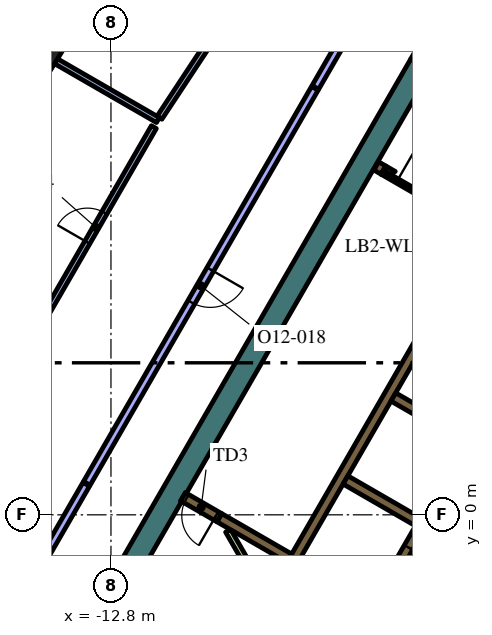
"""IFC4 building model, lengths in metres.
Left out: names, types, materials, properties, quantities, classifications, styles, units other than length and angle.
Written with IfcOpenShell. Run it as: python <this file> out.ifc"""

import sys

from ifc_helpers import new_model, si_unit, direction, frame, frame_2d, origin, origin_2d, place, context, subcontext, project, spatial, polyline, rectangle, outline, extrude, element, fill, save


model = new_model("IFC4")
c1 = context("Model", 3, precision=1e-05, world=origin(), true_north=direction((0.0, 1.0)))
c2 = subcontext(c1, "Body", "Model", "MODEL_VIEW")
j1 = project(units=[si_unit("LENGTHUNIT", "METRE"), si_unit("PLANEANGLEUNIT", "RADIAN")], contexts=[c1])
p1 = place(None, origin())
s1 = spatial("IfcSite", under=j1, at=p1, CompositionType="ELEMENT")
p2 = place(p1, origin())
s2 = spatial("IfcBuilding", under=s1, at=p2, CompositionType="ELEMENT")
p3 = place(p2, frame((0.0, 0.0, 283.8)))
s3 = spatial("IfcBuildingStorey", under=s2, at=p3, CompositionType="ELEMENT", Elevation=283.8)
p4 = place(p3, frame((-14.556, 12.098, 0.0), z_axis=(0.0, 0.0, 1.0), x_axis=(-0.525609744083, -0.850725805959, 0.0)))
e1 = element("IfcColumn", 1, at=p4, inside=s3, PredefinedType="COLUMN", context=c2, shape_type="SweptSolid", body=[
    extrude(rectangle(XDim=1.0, YDim=0.7, at=origin_2d()), origin(), (0.0, 0.0, 1.0), 4.2),
])
p5 = place(p3, origin())
e2 = element("IfcWall", 2, at=p5, inside=s3, PredefinedType="SOLIDWALL", context=c2, shape_type="SweptSolid", body=[
    extrude(outline(polyline([(-15.502, -6.35), (-4.912, 11.992), (-4.393, 11.692), (-10.815, 0.569), (-10.84, 0.583), (-10.84, 0.583), (-10.84, 0.583), (-10.965, 0.367), (-10.965, 0.367), (-10.965, 0.367), (-10.94, 0.352), (-11.033, 0.191), (-14.809, -6.35), (-15.156, -6.95), (-15.502, -6.35)])), origin(), (0.0, 0.0, 1.0), 4.2),
])
p6 = place(p3, frame((-8.06, -1.311, 0.0), z_axis=(0.0, 0.0, 1.0), x_axis=(0.50000273126, 0.866023826885, 0.0)))
e3 = element("IfcWall", 3, at=p6, inside=s3, PredefinedType="SOLIDWALL", context=c2, shape_type="SweptSolid", body=[
    extrude(rectangle(XDim=10.33, YDim=0.25, at=frame_2d((5.165, 0.0))), origin(), (0.0, 0.0, 1.0), 4.2),
])
for number, where, z_axis, x_axis in (
    (4, (-5.369, 3.1, 0.0), (0.0, 0.0, 1.0), (0.866, -0.5, 0.0)),
    (5, (-4.724, -0.182, 0.0), (0.0, 0.0, 1.0), (-0.866, 0.5, 0.0)),
):
    element("IfcWall", number, at=place(p3, frame(where, z_axis=z_axis, x_axis=x_axis)), inside=s3, PredefinedType="SOLIDWALL", context=c2, shape_type="SweptSolid", body=[
        extrude(rectangle(XDim=2.2, YDim=0.25, at=frame_2d((1.1, 0.0))), origin(), (0.0, 0.0, 1.0), 4.2),
    ])
p7 = place(p3, frame((-9.95, -0.075, 0.0), z_axis=(0.0, 0.0, 1.0), x_axis=(0.865962177421, -0.500109495288, 0.0)))
e6 = element("IfcWall", 6, at=p7, inside=s3, PredefinedType="SOLIDWALL", context=c2, shape_type="SweptSolid", body=[
    extrude(rectangle(XDim=2.129, YDim=0.25, at=frame_2d((1.065, 0.0))), origin(), (0.0, 0.0, 1.0), 4.2),
])
p8 = place(p3, frame((-5.629, 9.07, 0.0), z_axis=(0.0, 0.0, 1.0), x_axis=(-0.866185586049, 0.49972245349, 0.0)))
e7 = element("IfcWall", 7, at=p8, inside=s3, PredefinedType="SOLIDWALL", context=c2, shape_type="SweptSolid", body=[
    extrude(rectangle(XDim=0.22, YDim=0.25, at=frame_2d((0.11, 0.0))), origin(), (0.0, 0.0, 1.0), 4.2),
])
e8 = element("IfcWall", 8, at=p5, inside=s3, PredefinedType="SOLIDWALL", context=c2, shape_type="SweptSolid", body=[
    extrude(outline(polyline([(-5.689, 8.96), (-5.69, 8.961), (-5.565, 9.177), (-5.319, 9.035), (-5.335, 9.026), (-5.351, 9.015), (-5.366, 9.002), (-5.379, 8.988), (-5.392, 8.972), (-5.402, 8.956), (-5.412, 8.939), (-5.629, 9.064), (-5.629, 9.064), (-5.689, 8.96)])), origin(), (0.0, 0.0, 1.0), 4.2),
])
p9 = place(p3, frame((-9.718, -0.417, 0.0), z_axis=(0.0, 0.0, 1.0), x_axis=(0.499966538646, -0.866044721844, 0.0)))
e9 = element("IfcWall", 9, at=p9, inside=s3, PredefinedType="PARTITIONING", context=c2, shape_type="SweptSolid", body=[
    extrude(rectangle(XDim=2.511, YDim=0.15, at=frame_2d((1.255, 0.0))), origin(), (0.0, 0.0, 1.0), 3.55),
])
p10 = place(p3, frame((-0.898, 6.194, 0.0), z_axis=(0.0, 0.0, 1.0), x_axis=(-0.499996202215, -0.866027596426, 0.0)))
e10 = element("IfcWall", 10, at=p10, inside=s3, PredefinedType="SOLIDWALL", context=c2, shape_type="SweptSolid", body=[
    extrude(rectangle(XDim=9.83, YDim=0.25, at=frame_2d((4.915, 0.0))), origin(), (0.0, 0.0, 1.0), 4.2),
])
p11 = place(p10, frame((0.585, 0.0, 0.0)))
e11 = element("IfcOpeningElement", 11, at=p11, cuts=e10, PredefinedType="OPENING", context=c2, shape_type="SweptSolid", body=[
    extrude(rectangle(XDim=1.1, YDim=2.1, at=frame_2d((0.55, 1.05))), frame((0.0, 0.135, 0.0), z_axis=(0.0, -1.0, 0.0), x_axis=(1.0, 0.0, 0.0)), (0.0, 0.0, 1.0), 0.27),
])
p12 = place(p10, frame((3.105, 0.0, 0.0)))
e12 = element("IfcOpeningElement", 12, at=p12, cuts=e10, PredefinedType="OPENING", context=c2, shape_type="SweptSolid", body=[
    extrude(rectangle(XDim=1.1, YDim=2.1, at=frame_2d((0.55, 1.05))), frame((0.0, 0.135, 0.0), z_axis=(0.0, -1.0, 0.0), x_axis=(1.0, 0.0, 0.0)), (0.0, 0.0, 1.0), 0.27),
])
p13 = place(p10, frame((5.625, 0.0, 0.0)))
e13 = element("IfcOpeningElement", 13, at=p13, cuts=e10, PredefinedType="OPENING", context=c2, shape_type="SweptSolid", body=[
    extrude(rectangle(XDim=1.1, YDim=2.1, at=frame_2d((0.55, 1.05))), frame((0.0, 0.135, 0.0), z_axis=(0.0, -1.0, 0.0), x_axis=(1.0, 0.0, 0.0)), (0.0, 0.0, 1.0), 0.27),
])
p14 = place(p10, frame((8.145, 0.0, 0.0)))
e14 = element("IfcOpeningElement", 14, at=p14, cuts=e10, PredefinedType="OPENING", context=c2, shape_type="SweptSolid", body=[
    extrude(rectangle(XDim=1.1, YDim=2.1, at=frame_2d((0.55, 1.05))), frame((0.0, 0.135, 0.0), z_axis=(0.0, -1.0, 0.0), x_axis=(1.0, 0.0, 0.0)), (0.0, 0.0, 1.0), 0.27),
])
p15 = place(p3, frame((-5.659, 9.012, 0.0), z_axis=(0.0, 0.0, 1.0), x_axis=(0.866009402589, -0.500027713859, 0.0)))
e15 = element("IfcWall", 15, at=p15, inside=s3, PredefinedType="PARTITIONING", context=c2, shape_type="SweptSolid", body=[
    extrude(rectangle(XDim=2.1, YDim=0.12, at=frame_2d((1.05, 0.0))), origin(), (0.0, 0.0, 1.0), 3.55),
])
p16 = place(p15, frame((0.45, 0.0, 0.0)))
e16 = element("IfcOpeningElement", 16, at=p16, cuts=e15, PredefinedType="OPENING", context=c2, shape_type="SweptSolid", body=[
    extrude(rectangle(XDim=1.2, YDim=2.1, at=frame_2d((0.6, 1.05))), frame((0.0, 0.07, 0.0), z_axis=(0.0, -1.0, 0.0), x_axis=(1.0, 0.0, 0.0)), (0.0, 0.0, 1.0), 0.14),
])
p17 = place(p3, frame((-4.652, 11.842, 0.0), z_axis=(0.0, 0.0, 1.0), x_axis=(0.500062241894, 0.865989465428, 0.0)))
e17 = element("IfcWall", 17, at=p17, inside=s3, PredefinedType="SOLIDWALL", context=c2, shape_type="SweptSolid", body=[
    extrude(rectangle(XDim=1.7, YDim=0.6, at=frame_2d((0.85, 0.0))), origin(), (0.0, 0.0, 1.0), 4.2),
])
p18 = place(p17, frame((0.25, 0.0, 0.0)))
e18 = element("IfcOpeningElement", 18, at=p18, cuts=e17, PredefinedType="OPENING", context=c2, shape_type="SweptSolid", body=[
    extrude(rectangle(XDim=1.2, YDim=2.1, at=frame_2d((0.6, 1.05))), frame((0.0, 0.31, 0.0), z_axis=(0.0, -1.0, 0.0), x_axis=(1.0, 0.0, 0.0)), (0.0, 0.0, 1.0), 0.62),
])
p19 = place(p3, frame((-9.95, -0.075, 0.0), z_axis=(0.0, 0.0, 1.0), x_axis=(-0.865952669392, 0.500125958508, 0.0)))
e19 = element("IfcWall", 19, at=p19, inside=s3, PredefinedType="SOLIDWALL", context=c2, shape_type="SweptSolid", body=[
    extrude(rectangle(XDim=1.1, YDim=0.25, at=frame_2d((0.55, 0.0))), origin(), (0.0, 0.0, 1.0), 4.2),
])
p20 = place(p19, frame((0.1, 0.0, 0.0)))
e20 = element("IfcOpeningElement", 20, at=p20, cuts=e19, PredefinedType="OPENING", context=c2, shape_type="SweptSolid", body=[
    extrude(rectangle(XDim=0.9, YDim=2.1, at=frame_2d((0.45, 1.05))), frame((0.0, 0.135, 0.0), z_axis=(0.0, -1.0, 0.0), x_axis=(1.0, 0.0, 0.0)), (0.0, 0.0, 1.0), 0.27),
])
p21 = place(p3, frame((-11.564, 10.387, 0.0), z_axis=(0.0, 0.0, 1.0), x_axis=(-0.86604641216, 0.499963610661, 0.0)))
e21 = element("IfcWall", 21, at=p21, inside=s3, PredefinedType="PARTITIONING", context=c2, shape_type="SweptSolid", body=[
    extrude(rectangle(XDim=3.096, YDim=0.15, at=frame_2d((1.548, 0.0))), origin(), (0.0, 0.0, 1.0), 3.55),
])
p22 = place(p3, frame((-11.523, 10.449, 0.0), z_axis=(0.0, 0.0, 1.0), x_axis=(0.550751709023, 0.834669129061, 0.0)))
e22 = element("IfcWall", 22, at=p22, inside=s3, PredefinedType="PARTITIONING", context=c2, shape_type="SweptSolid", body=[
    extrude(rectangle(XDim=5.788, YDim=0.15, at=frame_2d((2.894, 0.0))), origin(), (0.0, 0.0, 1.0), 3.55),
])
p23 = place(p22, frame((2.488, 0.0, 0.0)))
e23 = element("IfcOpeningElement", 23, at=p23, cuts=e22, PredefinedType="OPENING", context=c2, shape_type="SweptSolid", body=[
    extrude(rectangle(XDim=0.9, YDim=2.1, at=frame_2d((0.45, 1.05))), frame((0.0, 0.085, 0.0), z_axis=(0.0, -1.0, 0.0), x_axis=(1.0, 0.0, 0.0)), (0.0, 0.0, 1.0), 0.17),
])
p24 = place(p3, frame((-14.74, 4.887, 0.0), z_axis=(0.0, 0.0, 1.0), x_axis=(0.500007141444, 0.86602128063, 0.0)))
e24 = element("IfcWall", 24, at=p24, inside=s3, PredefinedType="PARTITIONING", context=c2, shape_type="SweptSolid", body=[
    extrude(rectangle(XDim=6.137, YDim=0.15, at=frame_2d((3.068, 0.0))), origin(), (0.0, 0.0, 1.0), 3.55),
])
p25 = place(p24, frame((2.637, 0.0, 0.0)))
e25 = element("IfcOpeningElement", 25, at=p25, cuts=e24, PredefinedType="OPENING", context=c2, shape_type="SweptSolid", body=[
    extrude(rectangle(XDim=0.9, YDim=2.1, at=frame_2d((0.45, 1.05))), frame((0.0, 0.085, 0.0), z_axis=(0.0, -1.0, 0.0), x_axis=(1.0, 0.0, 0.0)), (0.0, 0.0, 1.0), 0.17),
])
p26 = place(p3, frame((-7.436, 11.221, 0.0), z_axis=(0.0, 0.0, 1.0), x_axis=(-0.49999894854, -0.866026010844, 0.0)))
e26 = element("IfcWall", 26, at=p26, inside=s3, PredefinedType="PARTITIONING", context=c2, shape_type="SweptSolid", body=[
    extrude(rectangle(XDim=12.0, YDim=0.2, at=frame_2d((6.0, 0.0))), origin(), (0.0, 0.0, 1.0), 3.55),
])
p27 = place(p26, frame((5.5, 0.0, 0.0)))
e27 = element("IfcOpeningElement", 27, at=p27, cuts=e26, PredefinedType="OPENING", context=c2, shape_type="SweptSolid", body=[
    extrude(rectangle(XDim=1.0, YDim=2.1, at=frame_2d((0.5, 1.05))), frame((0.0, 0.11, 0.0), z_axis=(0.0, -1.0, 0.0), x_axis=(1.0, 0.0, 0.0)), (0.0, 0.0, 1.0), 0.22),
])
p28 = place(p3, frame((-13.451, 0.803, 0.0), z_axis=(0.0, 0.0, 1.0), x_axis=(-0.499982585408, -0.86603545787, 0.0)))
e28 = element("IfcWall", 28, at=p28, inside=s3, PredefinedType="PARTITIONING", context=c2, shape_type="SweptSolid", body=[
    extrude(rectangle(XDim=8.26, YDim=0.2, at=frame_2d((4.13, 0.0))), origin(), (0.0, 0.0, 1.0), 3.55),
])
p29 = place(p3, frame((-3.306, 18.374, 0.0), z_axis=(0.0, 0.0, 1.0), x_axis=(-0.499999798456, -0.866025520146, 0.0)))
e29 = element("IfcWall", 29, at=p29, inside=s3, PredefinedType="PARTITIONING", context=c2, shape_type="SweptSolid", body=[
    extrude(rectangle(XDim=8.229, YDim=0.2, at=frame_2d((4.115, 0.0))), origin(), (0.0, 0.0, 1.0), 3.55),
])
p30 = place(p14, origin())
e30 = element("IfcDoor", 30, at=p30, inside=s3, OperationType="DOUBLE_DOOR_SLIDING", PredefinedType="DOOR", context=c2, shape_type="SweptSolid", body=[
    extrude(rectangle(XDim=1.1, YDim=2.1, at=frame_2d((0.55, 1.05))), frame((0.0, 0.025, 0.0), z_axis=(0.0, -1.0, 0.0), x_axis=(1.0, 0.0, 0.0)), (0.0, 0.0, 1.0), 0.05),
])
fill(e14, e30)
p31 = place(p16, origin())
e31 = element("IfcDoor", 31, at=p31, inside=s3, OperationType="SINGLE_SWING_LEFT", PredefinedType="DOOR", context=c2, shape_type="SweptSolid", body=[
    extrude(rectangle(XDim=1.2, YDim=2.1, at=frame_2d((0.6, 1.05))), frame((0.0, 0.025, 0.0), z_axis=(0.0, -1.0, 0.0), x_axis=(1.0, 0.0, 0.0)), (0.0, 0.0, 1.0), 0.05),
])
fill(e16, e31)
p32 = place(p20, origin())
e32 = element("IfcDoor", 32, at=p32, inside=s3, OperationType="SINGLE_SWING_LEFT", PredefinedType="DOOR", context=c2, shape_type="SweptSolid", body=[
    extrude(rectangle(XDim=0.9, YDim=2.1, at=frame_2d((0.45, 1.05))), frame((0.0, 0.025, 0.0), z_axis=(0.0, -1.0, 0.0), x_axis=(1.0, 0.0, 0.0)), (0.0, 0.0, 1.0), 0.05),
])
fill(e20, e32)
p33 = place(p25, origin())
e33 = element("IfcDoor", 33, at=p33, inside=s3, OperationType="SINGLE_SWING_RIGHT", PredefinedType="DOOR", context=c2, shape_type="SweptSolid", body=[
    extrude(rectangle(XDim=0.9, YDim=2.1, at=frame_2d((0.45, 1.05))), frame((0.0, 0.025, 0.0), z_axis=(0.0, -1.0, 0.0), x_axis=(1.0, 0.0, 0.0)), (0.0, 0.0, 1.0), 0.05),
])
fill(e25, e33)
p34 = place(p27, origin())
e34 = element("IfcDoor", 34, at=p34, inside=s3, OperationType="SINGLE_SWING_RIGHT", PredefinedType="DOOR", context=c2, shape_type="SweptSolid", body=[
    extrude(rectangle(XDim=1.0, YDim=2.1, at=frame_2d((0.5, 1.05))), frame((0.0, 0.025, 0.0), z_axis=(0.0, -1.0, 0.0), x_axis=(1.0, 0.0, 0.0)), (0.0, 0.0, 1.0), 0.05),
])
fill(e27, e34)
save(model, sys.argv[1])
